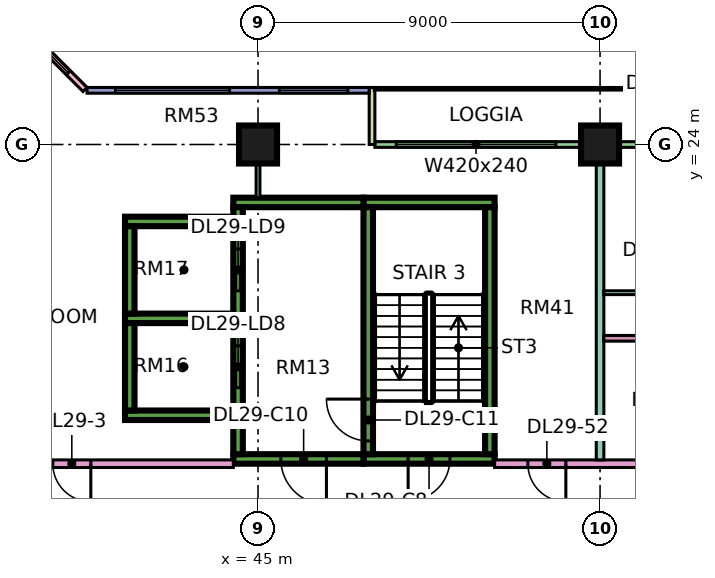
"""IFC4 building model, lengths in metres.
Left out: names, types, materials, properties, quantities, classifications, styles, units other than length and angle.
Written with IfcOpenShell. Run it as: python <this file> out.ifc"""

import sys

from ifc_helpers import new_model, si_unit, direction, frame, frame_2d, origin, origin_2d, place, context, subcontext, project, spatial, rectangle, extrude, element, fill, save


model = new_model("IFC4")
c1 = context("Model", 3, precision=1e-05, world=origin(), true_north=direction((0.0, 1.0)))
c2 = subcontext(c1, "Body", "Model", "MODEL_VIEW")
j1 = project(units=[si_unit("LENGTHUNIT", "METRE"), si_unit("PLANEANGLEUNIT", "RADIAN")], contexts=[c1])
p1 = place(None, origin())
s1 = spatial("IfcSite", under=j1, at=p1, CompositionType="ELEMENT")
p2 = place(p1, origin())
s2 = spatial("IfcBuilding", under=s1, at=p2, CompositionType="ELEMENT")
p3 = place(p2, frame((0.0, 0.0, 125.65)))
s3 = spatial("IfcBuildingStorey", under=s2, at=p3, CompositionType="ELEMENT", Elevation=125.65)
for number, where, z_axis, x_axis in (
    (1, (45.0, 24.0, 0.0), (0.0, 0.0, 1.0), (1.0, 0.0, 0.0)),
    (2, (54.0, 24.0, 0.0), (0.0, 0.0, 1.0), (1.0, 0.0, 0.0)),
):
    element("IfcColumn", number, at=place(p3, frame(where, z_axis=z_axis, x_axis=x_axis)), inside=s3, PredefinedType="COLUMN", context=c2, shape_type="SweptSolid", body=[
        extrude(rectangle(XDim=1.0, YDim=1.0, at=origin_2d()), origin(), (0.0, 0.0, 1.0), 3.75),
    ])
p4 = place(p3, frame((47.775, 15.725, 0.0), z_axis=(0.0, 0.0, 1.0), x_axis=(1.0, 0.0, 0.0)))
e3 = element("IfcWall", 3, at=p4, inside=s3, PredefinedType="SHEAR", context=c2, shape_type="SweptSolid", body=[
    extrude(rectangle(XDim=3.45, YDim=0.25, at=frame_2d((1.725, 0.0))), origin(), (0.0, 0.0, 1.0), 3.75),
])
p5 = place(p4, frame((1.175, 0.0, 0.0)))
e4 = element("IfcOpeningElement", 4, at=p5, cuts=e3, PredefinedType="OPENING", context=c2, shape_type="SweptSolid", body=[
    extrude(rectangle(XDim=1.1, YDim=2.2, at=frame_2d((0.55, 1.1))), frame((0.0, 0.135, 0.0), z_axis=(0.0, -1.0, 0.0), x_axis=(1.0, 0.0, 0.0)), (0.0, 0.0, 1.0), 0.27),
])
p6 = place(p3, frame((47.775, 22.475, 0.0), z_axis=(0.0, 0.0, 1.0), x_axis=(1.0, 0.0, 0.0)))
e5 = element("IfcWall", 5, at=p6, inside=s3, PredefinedType="SHEAR", context=c2, shape_type="SweptSolid", body=[
    extrude(rectangle(XDim=3.45, YDim=0.25, at=frame_2d((1.725, 0.0))), origin(), (0.0, 0.0, 1.0), 3.75),
])
p7 = place(p3, frame((47.9, 15.85, 0.0), z_axis=(0.0, 0.0, 1.0), x_axis=(0.0, 1.0, 0.0)))
e6 = element("IfcWall", 6, at=p7, inside=s3, PredefinedType="SHEAR", context=c2, shape_type="SweptSolid", body=[
    extrude(rectangle(XDim=6.5, YDim=0.25, at=frame_2d((3.25, 0.0))), origin(), (0.0, 0.0, 1.0), 3.75),
])
p8 = place(p7, frame((0.35, 0.0, 0.0)))
e7 = element("IfcOpeningElement", 7, at=p8, cuts=e6, PredefinedType="OPENING", context=c2, shape_type="SweptSolid", body=[
    extrude(rectangle(XDim=1.1, YDim=2.2, at=frame_2d((0.55, 1.1))), frame((0.0, 0.135, 0.0), z_axis=(0.0, -1.0, 0.0), x_axis=(1.0, 0.0, 0.0)), (0.0, 0.0, 1.0), 0.27),
])
p9 = place(p3, frame((51.1, 15.85, 0.0), z_axis=(0.0, 0.0, 1.0), x_axis=(0.0, 1.0, 0.0)))
e8 = element("IfcWall", 8, at=p9, inside=s3, PredefinedType="SHEAR", context=c2, shape_type="SweptSolid", body=[
    extrude(rectangle(XDim=6.5, YDim=0.25, at=frame_2d((3.25, 0.0))), origin(), (0.0, 0.0, 1.0), 3.75),
])
p10 = place(p3, frame((44.35, 15.725, 0.0), z_axis=(0.0, 0.0, 1.0), x_axis=(1.0, 0.0, 0.0)))
e9 = element("IfcWall", 9, at=p10, inside=s3, PredefinedType="SHEAR", context=c2, shape_type="SweptSolid", body=[
    extrude(rectangle(XDim=3.425, YDim=0.25, at=frame_2d((1.712, 0.0))), origin(), (0.0, 0.0, 1.0), 3.75),
])
p11 = place(p10, frame((1.25, 0.0, 0.0)))
e10 = element("IfcOpeningElement", 10, at=p11, cuts=e9, PredefinedType="OPENING", context=c2, shape_type="SweptSolid", body=[
    extrude(rectangle(XDim=1.2, YDim=2.2, at=frame_2d((0.6, 1.1))), frame((0.0, 0.135, 0.0), z_axis=(0.0, -1.0, 0.0), x_axis=(1.0, 0.0, 0.0)), (0.0, 0.0, 1.0), 0.27),
])
p12 = place(p3, frame((44.35, 22.475, 0.0), z_axis=(0.0, 0.0, 1.0), x_axis=(1.0, 0.0, 0.0)))
e11 = element("IfcWall", 11, at=p12, inside=s3, PredefinedType="SHEAR", context=c2, shape_type="SweptSolid", body=[
    extrude(rectangle(XDim=3.425, YDim=0.25, at=frame_2d((1.712, 0.0))), origin(), (0.0, 0.0, 1.0), 3.75),
])
p13 = place(p3, frame((44.475, 15.85, 0.0), z_axis=(0.0, 0.0, 1.0), x_axis=(0.0, 1.0, 0.0)))
e12 = element("IfcWall", 12, at=p13, inside=s3, PredefinedType="SHEAR", context=c2, shape_type="SweptSolid", body=[
    extrude(rectangle(XDim=6.5, YDim=0.25, at=frame_2d((3.25, 0.0))), origin(), (0.0, 0.0, 1.0), 3.75),
])
p14 = place(p13, frame((1.75, 0.0, 0.0)))
e13 = element("IfcOpeningElement", 13, at=p14, cuts=e12, PredefinedType="OPENING", context=c2, shape_type="SweptSolid", body=[
    extrude(rectangle(XDim=1.1, YDim=2.2, at=frame_2d((0.55, 1.1))), frame((0.0, 0.135, 0.0), z_axis=(0.0, -1.0, 0.0), x_axis=(1.0, 0.0, 0.0)), (0.0, 0.0, 1.0), 0.27),
])
p15 = place(p13, frame((4.3, 0.0, 0.0)))
e14 = element("IfcOpeningElement", 14, at=p15, cuts=e12, PredefinedType="OPENING", context=c2, shape_type="SweptSolid", body=[
    extrude(rectangle(XDim=1.1, YDim=2.2, at=frame_2d((0.55, 1.1))), frame((0.0, 0.135, 0.0), z_axis=(0.0, -1.0, 0.0), x_axis=(1.0, 0.0, 0.0)), (0.0, 0.0, 1.0), 0.27),
])
for number, where, z_axis, x_axis in (
    (15, (41.5, 16.875, 0.0), (0.0, 0.0, 1.0), (1.0, 0.0, 0.0)),
    (16, (41.5, 19.425, 0.0), (0.0, 0.0, 1.0), (1.0, 0.0, 0.0)),
    (17, (41.5, 21.975, 0.0), (0.0, 0.0, 1.0), (1.0, 0.0, 0.0)),
):
    element("IfcWall", number, at=place(p3, frame(where, z_axis=z_axis, x_axis=x_axis)), inside=s3, PredefinedType="SHEAR", context=c2, shape_type="SweptSolid", body=[
        extrude(rectangle(XDim=2.85, YDim=0.25, at=frame_2d((1.425, 0.0))), origin(), (0.0, 0.0, 1.0), 3.75),
    ])
for number, where, z_axis, x_axis in (
    (18, (41.625, 17.0, 0.0), (0.0, 0.0, 1.0), (0.0, 1.0, 0.0)),
    (19, (41.625, 19.55, 0.0), (0.0, 0.0, 1.0), (0.0, 1.0, 0.0)),
):
    element("IfcWall", number, at=place(p3, frame(where, z_axis=z_axis, x_axis=x_axis)), inside=s3, PredefinedType="SHEAR", context=c2, shape_type="SweptSolid", body=[
        extrude(rectangle(XDim=2.3, YDim=0.25, at=frame_2d((1.15, 0.0))), origin(), (0.0, 0.0, 1.0), 3.75),
    ])
p16 = place(p3, frame((59.925, 24.0, 0.0), z_axis=(0.0, 0.0, 1.0), x_axis=(-1.0, 0.0, 0.0)))
e20 = element("IfcWall", 20, at=p16, inside=s3, PredefinedType="SOLIDWALL", context=c2, shape_type="SweptSolid", body=[
    extrude(rectangle(XDim=11.85, YDim=0.15, at=frame_2d((5.925, 0.0))), origin(), (0.0, 0.0, 1.0), 3.35),
])
p17 = place(p16, frame((0.562, 0.0, 0.45)))
e21 = element("IfcOpeningElement", 21, at=p17, cuts=e20, PredefinedType="OPENING", context=c2, shape_type="SweptSolid", body=[
    extrude(rectangle(XDim=1.8, YDim=2.4, at=frame_2d((0.9, 1.2))), frame((0.0, 0.085, 0.0), z_axis=(0.0, -1.0, 0.0), x_axis=(1.0, 0.0, 0.0)), (0.0, 0.0, 1.0), 0.17),
])
p18 = place(p16, frame((3.525, 0.0, 0.0)))
e22 = element("IfcOpeningElement", 22, at=p18, cuts=e20, PredefinedType="OPENING", context=c2, shape_type="SweptSolid", body=[
    extrude(rectangle(XDim=1.2, YDim=2.4, at=frame_2d((0.6, 1.2))), frame((0.0, 0.085, 0.0), z_axis=(0.0, -1.0, 0.0), x_axis=(1.0, 0.0, 0.0)), (0.0, 0.0, 1.0), 0.17),
])
p19 = place(p16, frame((7.087, 0.0, 0.45)))
e23 = element("IfcOpeningElement", 23, at=p19, cuts=e20, PredefinedType="OPENING", context=c2, shape_type="SweptSolid", body=[
    extrude(rectangle(XDim=4.2, YDim=2.4, at=frame_2d((2.1, 1.2))), frame((0.0, 0.085, 0.0), z_axis=(0.0, -1.0, 0.0), x_axis=(1.0, 0.0, 0.0)), (0.0, 0.0, 1.0), 0.17),
])
p20 = place(p3, frame((48.0, 25.5, 0.0), z_axis=(0.0, 0.0, 1.0), x_axis=(0.0, -1.0, 0.0)))
e24 = element("IfcWall", 24, at=p20, inside=s3, PredefinedType="SOLIDWALL", context=c2, shape_type="SweptSolid", body=[
    extrude(rectangle(XDim=1.5, YDim=0.15, at=frame_2d((0.75, 0.0))), origin(), (0.0, 0.0, 1.0), 3.35),
])
p21 = place(p3, frame((47.925, 25.425, 0.0), z_axis=(0.0, 0.0, 1.0), x_axis=(-1.0, 0.0, 0.0)))
e25 = element("IfcWall", 25, at=p21, inside=s3, PredefinedType="SOLIDWALL", context=c2, shape_type="SweptSolid", body=[
    extrude(rectangle(XDim=7.425, YDim=0.15, at=frame_2d((3.712, 0.0))), origin(), (0.0, 0.0, 1.0), 3.35),
])
p22 = place(p21, frame((0.562, 0.0, 0.45)))
e26 = element("IfcOpeningElement", 26, at=p22, cuts=e25, PredefinedType="OPENING", context=c2, shape_type="SweptSolid", body=[
    extrude(rectangle(XDim=1.8, YDim=2.4, at=frame_2d((0.9, 1.2))), frame((0.0, 0.085, 0.0), z_axis=(0.0, -1.0, 0.0), x_axis=(1.0, 0.0, 0.0)), (0.0, 0.0, 1.0), 0.17),
])
p23 = place(p21, frame((3.675, 0.0, 0.45)))
e27 = element("IfcOpeningElement", 27, at=p23, cuts=e25, PredefinedType="OPENING", context=c2, shape_type="SweptSolid", body=[
    extrude(rectangle(XDim=3.0, YDim=2.4, at=frame_2d((1.5, 1.2))), frame((0.0, 0.085, 0.0), z_axis=(0.0, -1.0, 0.0), x_axis=(1.0, 0.0, 0.0)), (0.0, 0.0, 1.0), 0.17),
])
p24 = place(p3, frame((40.447, 25.447, 0.0), z_axis=(0.0, 0.0, 1.0), x_axis=(-0.707106781187, 0.707106781187, 0.0)))
e28 = element("IfcWall", 28, at=p24, inside=s3, PredefinedType="SOLIDWALL", context=c2, shape_type="SweptSolid", body=[
    extrude(rectangle(XDim=4.243, YDim=0.15, at=frame_2d((2.121, 0.0))), origin(), (0.0, 0.0, 1.0), 3.35),
])
p25 = place(p24, frame((0.621, 0.0, 0.45)))
e29 = element("IfcOpeningElement", 29, at=p25, cuts=e28, PredefinedType="OPENING", context=c2, shape_type="SweptSolid", body=[
    extrude(rectangle(XDim=3.0, YDim=2.4, at=frame_2d((1.5, 1.2))), frame((0.0, 0.085, 0.0), z_axis=(0.0, -1.0, 0.0), x_axis=(1.0, 0.0, 0.0)), (0.0, 0.0, 1.0), 0.17),
])
p26 = place(p3, frame((34.0, 15.6, 0.0), z_axis=(0.0, 0.0, 1.0), x_axis=(1.0, 0.0, 0.0)))
e30 = element("IfcWall", 30, at=p26, inside=s3, PredefinedType="PARTITIONING", context=c2, shape_type="SweptSolid", body=[
    extrude(rectangle(XDim=10.35, YDim=0.2, at=frame_2d((5.175, 0.0))), origin(), (0.0, 0.0, 1.0), 3.35),
])
p27 = place(p26, frame((5.6, 0.0, 0.0)))
e31 = element("IfcOpeningElement", 31, at=p27, cuts=e30, PredefinedType="OPENING", context=c2, shape_type="SweptSolid", body=[
    extrude(rectangle(XDim=1.0, YDim=2.1, at=frame_2d((0.5, 1.05))), frame((0.0, 0.11, 0.0), z_axis=(0.0, -1.0, 0.0), x_axis=(1.0, 0.0, 0.0)), (0.0, 0.0, 1.0), 0.22),
])
p28 = place(p26, frame((0.45, 0.0, 0.0)))
e32 = element("IfcOpeningElement", 32, at=p28, cuts=e30, PredefinedType="OPENING", context=c2, shape_type="SweptSolid", body=[
    extrude(rectangle(XDim=1.2, YDim=2.1, at=frame_2d((0.6, 1.05))), frame((0.0, 0.11, 0.0), z_axis=(0.0, -1.0, 0.0), x_axis=(1.0, 0.0, 0.0)), (0.0, 0.0, 1.0), 0.22),
])
p29 = place(p3, frame((45.0, 22.6, 0.0), z_axis=(0.0, 0.0, 1.0), x_axis=(0.0, 1.0, 0.0)))
e33 = element("IfcWall", 33, at=p29, inside=s3, PredefinedType="PARTITIONING", context=c2, shape_type="SweptSolid", body=[
    extrude(rectangle(XDim=1.4, YDim=0.1, at=frame_2d((0.7, 0.0))), origin(), (0.0, 0.0, 1.0), 3.35),
])
p30 = place(p3, frame((51.225, 15.6, 0.0), z_axis=(0.0, 0.0, 1.0), x_axis=(1.0, 0.0, 0.0)))
e34 = element("IfcWall", 34, at=p30, inside=s3, PredefinedType="PARTITIONING", context=c2, shape_type="SweptSolid", body=[
    extrude(rectangle(XDim=22.125, YDim=0.2, at=frame_2d((11.062, 0.0))), origin(), (0.0, 0.0, 1.0), 3.35),
])
p31 = place(p30, frame((18.725, 0.0, 0.0)))
e35 = element("IfcOpeningElement", 35, at=p31, cuts=e34, PredefinedType="OPENING", context=c2, shape_type="SweptSolid", body=[
    extrude(rectangle(XDim=1.0, YDim=2.1, at=frame_2d((0.5, 1.05))), frame((0.0, 0.11, 0.0), z_axis=(0.0, -1.0, 0.0), x_axis=(1.0, 0.0, 0.0)), (0.0, 0.0, 1.0), 0.22),
])
p32 = place(p30, frame((0.875, 0.0, 0.0)))
e36 = element("IfcOpeningElement", 36, at=p32, cuts=e34, PredefinedType="OPENING", context=c2, shape_type="SweptSolid", body=[
    extrude(rectangle(XDim=1.0, YDim=2.1, at=frame_2d((0.5, 1.05))), frame((0.0, 0.11, 0.0), z_axis=(0.0, -1.0, 0.0), x_axis=(1.0, 0.0, 0.0)), (0.0, 0.0, 1.0), 0.22),
])
p33 = place(p3, frame((54.0, 15.7, 0.0), z_axis=(0.0, 0.0, 1.0), x_axis=(0.0, 1.0, 0.0)))
e37 = element("IfcWall", 37, at=p33, inside=s3, PredefinedType="PARTITIONING", context=c2, shape_type="SweptSolid", body=[
    extrude(rectangle(XDim=8.226, YDim=0.2, at=frame_2d((4.113, 0.0))), origin(), (0.0, 0.0, 1.0), 3.35),
])
p34 = place(p3, frame((54.1, 18.9, 0.0), z_axis=(0.0, 0.0, 1.0), x_axis=(1.0, 0.0, 0.0)))
e38 = element("IfcWall", 38, at=p34, inside=s3, PredefinedType="PARTITIONING", context=c2, shape_type="SweptSolid", body=[
    extrude(rectangle(XDim=14.975, YDim=0.15, at=frame_2d((7.487, 0.0))), origin(), (0.0, 0.0, 1.0), 3.35),
])
p35 = place(p34, frame((2.3, 0.0, 0.0)))
e39 = element("IfcOpeningElement", 39, at=p35, cuts=e38, PredefinedType="OPENING", context=c2, shape_type="SweptSolid", body=[
    extrude(rectangle(XDim=0.9, YDim=2.1, at=frame_2d((0.45, 1.05))), frame((0.0, 0.085, 0.0), z_axis=(0.0, -1.0, 0.0), x_axis=(1.0, 0.0, 0.0)), (0.0, 0.0, 1.0), 0.17),
])
p36 = place(p34, frame((7.1, 0.0, 0.0)))
e40 = element("IfcOpeningElement", 40, at=p36, cuts=e38, PredefinedType="OPENING", context=c2, shape_type="SweptSolid", body=[
    extrude(rectangle(XDim=0.8, YDim=2.1, at=frame_2d((0.4, 1.05))), frame((0.0, 0.085, 0.0), z_axis=(0.0, -1.0, 0.0), x_axis=(1.0, 0.0, 0.0)), (0.0, 0.0, 1.0), 0.17),
])
p37 = place(p34, frame((10.55, 0.0, 0.0)))
e41 = element("IfcOpeningElement", 41, at=p37, cuts=e38, PredefinedType="OPENING", context=c2, shape_type="SweptSolid", body=[
    extrude(rectangle(XDim=0.8, YDim=2.1, at=frame_2d((0.4, 1.05))), frame((0.0, 0.085, 0.0), z_axis=(0.0, -1.0, 0.0), x_axis=(1.0, 0.0, 0.0)), (0.0, 0.0, 1.0), 0.17),
])
p38 = place(p3, frame((54.1, 20.1, 0.0), z_axis=(0.0, 0.0, 1.0), x_axis=(1.0, 0.0, 0.0)))
e42 = element("IfcWall", 42, at=p38, inside=s3, PredefinedType="PARTITIONING", context=c2, shape_type="SweptSolid", body=[
    extrude(rectangle(XDim=11.95, YDim=0.1, at=frame_2d((5.975, 0.0))), origin(), (0.0, 0.0, 1.0), 3.35),
])
p39 = place(p38, frame((0.95, 0.0, 0.0)))
e43 = element("IfcOpeningElement", 43, at=p39, cuts=e42, PredefinedType="OPENING", context=c2, shape_type="SweptSolid", body=[
    extrude(rectangle(XDim=0.9, YDim=2.1, at=frame_2d((0.45, 1.05))), frame((0.0, 0.06, 0.0), z_axis=(0.0, -1.0, 0.0), x_axis=(1.0, 0.0, 0.0)), (0.0, 0.0, 1.0), 0.12),
])
p40 = place(p38, frame((3.95, 0.0, 0.0)))
e44 = element("IfcOpeningElement", 44, at=p40, cuts=e42, PredefinedType="OPENING", context=c2, shape_type="SweptSolid", body=[
    extrude(rectangle(XDim=0.9, YDim=2.1, at=frame_2d((0.45, 1.05))), frame((0.0, 0.06, 0.0), z_axis=(0.0, -1.0, 0.0), x_axis=(1.0, 0.0, 0.0)), (0.0, 0.0, 1.0), 0.12),
])
p41 = place(p38, frame((6.55, 0.0, 0.0)))
e45 = element("IfcOpeningElement", 45, at=p41, cuts=e42, PredefinedType="OPENING", context=c2, shape_type="SweptSolid", body=[
    extrude(rectangle(XDim=1.6, YDim=2.1, at=frame_2d((0.8, 1.05))), frame((0.0, 0.06, 0.0), z_axis=(0.0, -1.0, 0.0), x_axis=(1.0, 0.0, 0.0)), (0.0, 0.0, 1.0), 0.12),
])
p42 = place(p38, frame((9.95, 0.0, 0.0)))
e46 = element("IfcOpeningElement", 46, at=p42, cuts=e42, PredefinedType="OPENING", context=c2, shape_type="SweptSolid", body=[
    extrude(rectangle(XDim=0.9, YDim=2.1, at=frame_2d((0.45, 1.05))), frame((0.0, 0.06, 0.0), z_axis=(0.0, -1.0, 0.0), x_axis=(1.0, 0.0, 0.0)), (0.0, 0.0, 1.0), 0.12),
])
p43 = place(p19, origin())
e47 = element("IfcWindow", 47, at=p43, inside=s3, PartitioningType="SINGLE_PANEL", PredefinedType="WINDOW", context=c2, shape_type="SweptSolid", body=[
    extrude(rectangle(XDim=4.2, YDim=2.4, at=frame_2d((2.1, 1.2))), frame((0.0, 0.03, 0.0), z_axis=(0.0, -1.0, 0.0), x_axis=(1.0, 0.0, 0.0)), (0.0, 0.0, 1.0), 0.06),
])
fill(e23, e47)
p44 = place(p22, origin())
e48 = element("IfcWindow", 48, at=p44, inside=s3, PartitioningType="SINGLE_PANEL", PredefinedType="WINDOW", context=c2, shape_type="SweptSolid", body=[
    extrude(rectangle(XDim=1.8, YDim=2.4, at=frame_2d((0.9, 1.2))), frame((0.0, 0.03, 0.0), z_axis=(0.0, -1.0, 0.0), x_axis=(1.0, 0.0, 0.0)), (0.0, 0.0, 1.0), 0.06),
])
fill(e26, e48)
p45 = place(p23, origin())
e49 = element("IfcWindow", 49, at=p45, inside=s3, PartitioningType="SINGLE_PANEL", PredefinedType="WINDOW", context=c2, shape_type="SweptSolid", body=[
    extrude(rectangle(XDim=3.0, YDim=2.4, at=frame_2d((1.5, 1.2))), frame((0.0, 0.03, 0.0), z_axis=(0.0, -1.0, 0.0), x_axis=(1.0, 0.0, 0.0)), (0.0, 0.0, 1.0), 0.06),
])
fill(e27, e49)
p46 = place(p25, origin())
e50 = element("IfcWindow", 50, at=p46, inside=s3, PartitioningType="SINGLE_PANEL", PredefinedType="WINDOW", context=c2, shape_type="SweptSolid", body=[
    extrude(rectangle(XDim=3.0, YDim=2.4, at=frame_2d((1.5, 1.2))), frame((0.0, 0.03, 0.0), z_axis=(0.0, -1.0, 0.0), x_axis=(1.0, 0.0, 0.0)), (0.0, 0.0, 1.0), 0.06),
])
fill(e29, e50)
p47 = place(p5, frame((1.1, 0.0, 0.0), z_axis=(0.0, 0.0, 1.0), x_axis=(-1.0, 0.0, 0.0)))
e51 = element("IfcDoor", 51, at=p47, inside=s3, OperationType="SINGLE_SWING_LEFT", PredefinedType="DOOR", context=c2, shape_type="SweptSolid", body=[
    extrude(rectangle(XDim=1.1, YDim=2.2, at=frame_2d((0.55, 1.1))), frame((0.0, 0.025, 0.0), z_axis=(0.0, -1.0, 0.0), x_axis=(1.0, 0.0, 0.0)), (0.0, 0.0, 1.0), 0.05),
])
fill(e4, e51)
p48 = place(p11, origin())
e52 = element("IfcDoor", 52, at=p48, inside=s3, OperationType="SINGLE_SWING_RIGHT", PredefinedType="DOOR", context=c2, shape_type="SweptSolid", body=[
    extrude(rectangle(XDim=1.2, YDim=2.2, at=frame_2d((0.6, 1.1))), frame((0.0, 0.025, 0.0), z_axis=(0.0, -1.0, 0.0), x_axis=(1.0, 0.0, 0.0)), (0.0, 0.0, 1.0), 0.05),
])
fill(e10, e52)
p49 = place(p8, frame((1.1, 0.0, 0.0), z_axis=(0.0, 0.0, 1.0), x_axis=(-1.0, 0.0, 0.0)))
e53 = element("IfcDoor", 53, at=p49, inside=s3, OperationType="SINGLE_SWING_RIGHT", PredefinedType="DOOR", context=c2, shape_type="SweptSolid", body=[
    extrude(rectangle(XDim=1.1, YDim=2.2, at=frame_2d((0.55, 1.1))), frame((0.0, 0.025, 0.0), z_axis=(0.0, -1.0, 0.0), x_axis=(1.0, 0.0, 0.0)), (0.0, 0.0, 1.0), 0.05),
])
fill(e7, e53)
p50 = place(p14, origin())
e54 = element("IfcDoor", 54, at=p50, inside=s3, OperationType="DOUBLE_DOOR_SLIDING", PredefinedType="DOOR", context=c2, shape_type="SweptSolid", body=[
    extrude(rectangle(XDim=1.1, YDim=2.2, at=frame_2d((0.55, 1.1))), frame((0.0, 0.025, 0.0), z_axis=(0.0, -1.0, 0.0), x_axis=(1.0, 0.0, 0.0)), (0.0, 0.0, 1.0), 0.05),
])
fill(e13, e54)
p51 = place(p15, origin())
e55 = element("IfcDoor", 55, at=p51, inside=s3, OperationType="DOUBLE_DOOR_SLIDING", PredefinedType="DOOR", context=c2, shape_type="SweptSolid", body=[
    extrude(rectangle(XDim=1.1, YDim=2.2, at=frame_2d((0.55, 1.1))), frame((0.0, 0.025, 0.0), z_axis=(0.0, -1.0, 0.0), x_axis=(1.0, 0.0, 0.0)), (0.0, 0.0, 1.0), 0.05),
])
fill(e14, e55)
p52 = place(p27, origin())
e56 = element("IfcDoor", 56, at=p52, inside=s3, OperationType="SINGLE_SWING_RIGHT", PredefinedType="DOOR", context=c2, shape_type="SweptSolid", body=[
    extrude(rectangle(XDim=1.0, YDim=2.1, at=frame_2d((0.5, 1.05))), frame((0.0, 0.025, 0.0), z_axis=(0.0, -1.0, 0.0), x_axis=(1.0, 0.0, 0.0)), (0.0, 0.0, 1.0), 0.05),
])
fill(e31, e56)
p53 = place(p32, origin())
e57 = element("IfcDoor", 57, at=p53, inside=s3, OperationType="SINGLE_SWING_RIGHT", PredefinedType="DOOR", context=c2, shape_type="SweptSolid", body=[
    extrude(rectangle(XDim=1.0, YDim=2.1, at=frame_2d((0.5, 1.05))), frame((0.0, 0.025, 0.0), z_axis=(0.0, -1.0, 0.0), x_axis=(1.0, 0.0, 0.0)), (0.0, 0.0, 1.0), 0.05),
])
fill(e36, e57)
save(model, sys.argv[1])
